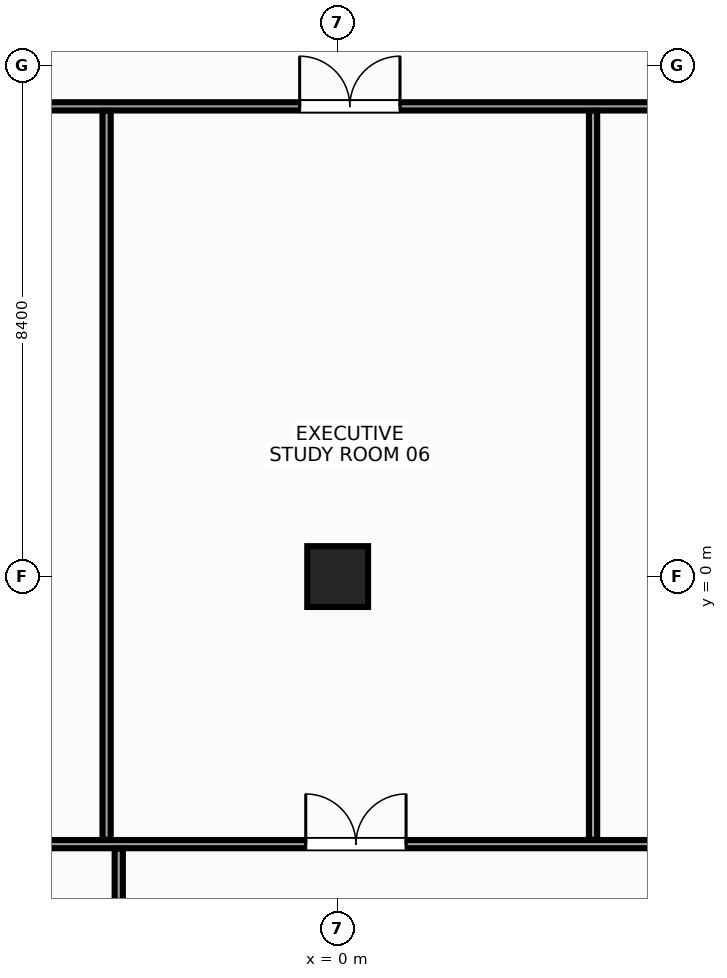
"""IFC4 building model, lengths in metres.
Left out: names, types, materials, properties, quantities, classifications, styles, units other than length and angle.
Written with IfcOpenShell. Run it as: python <this file> out.ifc"""

import sys

from ifc_helpers import new_model, si_unit, direction, frame, frame_2d, origin, origin_with_axes, origin_2d, place, context, subcontext, project, spatial, rectangle, extrude, source, transform, mapped, element, fill, save


model = new_model("IFC4")
c1 = context("Model", 3, precision=1e-05, world=origin(), true_north=direction((0.0, 1.0)))
c2 = subcontext(c1, "Body", "Model", "MODEL_VIEW")
j1 = project(units=[si_unit("LENGTHUNIT", "METRE"), si_unit("PLANEANGLEUNIT", "RADIAN")], contexts=[c1])
p1 = place(None, origin())
s1 = spatial("IfcSite", under=j1, at=p1, CompositionType="ELEMENT")
p2 = place(p1, origin())
s2 = spatial("IfcBuilding", under=s1, at=p2, CompositionType="ELEMENT")
p3 = place(p2, frame((0.0, 0.0, 131.6)))
s3 = spatial("IfcBuildingStorey", under=s2, at=p3, CompositionType="ELEMENT", Elevation=131.6)
m1 = source(origin(), c2, "Body", "SweptSolid", [
    extrude(rectangle(XDim=1.0, YDim=1.0, at=origin_2d()), origin(), (0.0, 0.0, 1.0), 3.6),
])
p4 = place(p3, origin_with_axes())
e1 = element("IfcColumn", 1, at=p4, inside=s3, PredefinedType="COLUMN", context=c2, shape_type="MappedRepresentation", body=[
    mapped(m1, transform((0.0, 0.0, 0.0), x_axis=(1.0, 0.0, 0.0), y_axis=(0.0, 1.0, 0.0), z_axis=(0.0, 0.0, 1.0), scale=1.0)),
])
m2 = source(origin(), c2, "Body", "SweptSolid", [
    extrude(rectangle(XDim=31.6, YDim=0.135, at=frame_2d((15.8, 0.0))), origin(), (0.0, 0.0, 1.0), 2.765),
])
p5 = place(p3, frame((-20.535, 7.732, 0.0), z_axis=(0.0, 0.0, 1.0), x_axis=(1.0, 0.0, 0.0)))
e2 = element("IfcWall", 2, at=p5, inside=s3, PredefinedType="PARTITIONING", context=c2, shape_type="MappedRepresentation", body=[
    mapped(m2, transform((0.0, 0.0, 0.0), x_axis=(1.0, 0.0, 0.0), y_axis=(0.0, 1.0, 0.0), z_axis=(0.0, 0.0, 1.0), scale=1.0)),
])
p6 = place(p5, frame((0.644, 0.0, 0.0)))
e3 = element("IfcOpeningElement", 3, at=p6, cuts=e2, PredefinedType="OPENING", context=c2, shape_type="SweptSolid", body=[
    extrude(rectangle(XDim=0.9, YDim=2.15, at=frame_2d((0.45, 1.075))), frame((0.0, 0.08, 0.0), z_axis=(0.0, -1.0, 0.0), x_axis=(1.0, 0.0, 0.0)), (0.0, 0.0, 1.0), 0.159),
])
p7 = place(p5, frame((5.21, 0.0, 0.0)))
e4 = element("IfcOpeningElement", 4, at=p7, cuts=e2, PredefinedType="OPENING", context=c2, shape_type="SweptSolid", body=[
    extrude(rectangle(XDim=1.65, YDim=2.35, at=frame_2d((0.825, 1.175))), frame((0.0, 0.08, 0.0), z_axis=(0.0, -1.0, 0.0), x_axis=(1.0, 0.0, 0.0)), (0.0, 0.0, 1.0), 0.159),
])
p8 = place(p5, frame((11.41, 0.0, 0.0)))
e5 = element("IfcOpeningElement", 5, at=p8, cuts=e2, PredefinedType="OPENING", context=c2, shape_type="SweptSolid", body=[
    extrude(rectangle(XDim=1.65, YDim=2.35, at=frame_2d((0.825, 1.175))), frame((0.0, 0.08, 0.0), z_axis=(0.0, -1.0, 0.0), x_axis=(1.0, 0.0, 0.0)), (0.0, 0.0, 1.0), 0.159),
])
p9 = place(p5, frame((19.91, 0.0, 0.0)))
e6 = element("IfcOpeningElement", 6, at=p9, cuts=e2, PredefinedType="OPENING", context=c2, shape_type="SweptSolid", body=[
    extrude(rectangle(XDim=1.65, YDim=2.35, at=frame_2d((0.825, 1.175))), frame((0.0, 0.08, 0.0), z_axis=(0.0, -1.0, 0.0), x_axis=(1.0, 0.0, 0.0)), (0.0, 0.0, 1.0), 0.159),
])
p10 = place(p5, frame((27.316, 0.0, 0.0)))
e7 = element("IfcOpeningElement", 7, at=p10, cuts=e2, PredefinedType="OPENING", context=c2, shape_type="SweptSolid", body=[
    extrude(rectangle(XDim=1.65, YDim=2.35, at=frame_2d((0.825, 1.175))), frame((0.0, 0.08, 0.0), z_axis=(0.0, -1.0, 0.0), x_axis=(1.0, 0.0, 0.0)), (0.0, 0.0, 1.0), 0.159),
])
m3 = source(origin(), c2, "Body", "SweptSolid", [
    extrude(rectangle(XDim=34.91, YDim=0.135, at=frame_2d((17.455, 0.0))), origin(), (0.0, 0.0, 1.0), 2.765),
])
p11 = place(p3, frame((-23.85, -4.4, 0.0), z_axis=(0.0, 0.0, 1.0), x_axis=(1.0, 0.0, 0.0)))
e8 = element("IfcWall", 8, at=p11, inside=s3, PredefinedType="PARTITIONING", context=c2, shape_type="MappedRepresentation", body=[
    mapped(m3, transform((0.0, 0.0, 0.0), x_axis=(1.0, 0.0, 0.0), y_axis=(0.0, 1.0, 0.0), z_axis=(0.0, 0.0, 1.0), scale=1.0)),
])
p12 = place(p11, frame((1.266, 0.0, 0.0)))
e9 = element("IfcOpeningElement", 9, at=p12, cuts=e8, PredefinedType="OPENING", context=c2, shape_type="SweptSolid", body=[
    extrude(rectangle(XDim=1.65, YDim=2.35, at=frame_2d((0.825, 1.175))), frame((0.0, 0.08, 0.0), z_axis=(0.0, -1.0, 0.0), x_axis=(1.0, 0.0, 0.0)), (0.0, 0.0, 1.0), 0.159),
])
p13 = place(p11, frame((8.725, 0.0, 0.0)))
e10 = element("IfcOpeningElement", 10, at=p13, cuts=e8, PredefinedType="OPENING", context=c2, shape_type="SweptSolid", body=[
    extrude(rectangle(XDim=1.65, YDim=2.35, at=frame_2d((0.825, 1.175))), frame((0.0, 0.08, 0.0), z_axis=(0.0, -1.0, 0.0), x_axis=(1.0, 0.0, 0.0)), (0.0, 0.0, 1.0), 0.159),
])
p14 = place(p11, frame((23.325, 0.0, 0.0)))
e11 = element("IfcOpeningElement", 11, at=p14, cuts=e8, PredefinedType="OPENING", context=c2, shape_type="SweptSolid", body=[
    extrude(rectangle(XDim=1.65, YDim=2.35, at=frame_2d((0.825, 1.175))), frame((0.0, 0.08, 0.0), z_axis=(0.0, -1.0, 0.0), x_axis=(1.0, 0.0, 0.0)), (0.0, 0.0, 1.0), 0.159),
])
m4 = source(origin(), c2, "Body", "SweptSolid", [
    extrude(rectangle(XDim=11.987, YDim=0.135, at=frame_2d((5.994, 0.0))), origin(), (0.0, 0.0, 1.0), 2.665),
])
for number, where, z_axis, x_axis in (
    (12, (-3.8, -4.327, 0.0), (0.0, 0.0, 1.0), (0.0, 1.0, 0.0)),
    (13, (4.2, -4.327, 0.0), (0.0, 0.0, 1.0), (0.0, 1.0, 0.0)),
):
    element("IfcWall", number, at=place(p3, frame(where, z_axis=z_axis, x_axis=x_axis)), inside=s3, PredefinedType="PARTITIONING", context=c2, shape_type="MappedRepresentation", body=[
        mapped(m4, transform((0.0, 0.0, 0.0), x_axis=(1.0, 0.0, 0.0), y_axis=(0.0, 1.0, 0.0), z_axis=(0.0, 0.0, 1.0), scale=1.0)),
    ])
m5 = source(origin(), c2, "Body", "SweptSolid", [
    extrude(rectangle(XDim=18.177, YDim=0.135, at=frame_2d((9.089, 0.0))), origin(), (0.0, 0.0, 1.0), 2.915),
])
p15 = place(p3, frame((-3.6, -22.65, 0.0), z_axis=(0.0, 0.0, 1.0), x_axis=(0.0, 1.0, 0.0)))
e14 = element("IfcWall", 14, at=p15, inside=s3, PredefinedType="PARTITIONING", context=c2, shape_type="MappedRepresentation", body=[
    mapped(m5, transform((0.0, 0.0, 0.0), x_axis=(1.0, 0.0, 0.0), y_axis=(0.0, 1.0, 0.0), z_axis=(0.0, 0.0, 1.0), scale=1.0)),
])
m6 = source(origin(), c2, "Body", "SweptSolid", [
    extrude(rectangle(XDim=1.65, YDim=2.35, at=frame_2d((0.825, 1.175))), frame((0.0, 0.025, 0.0), z_axis=(0.0, -1.0, 0.0), x_axis=(1.0, 0.0, 0.0)), (0.0, 0.0, 1.0), 0.05),
])
p16 = place(p9, origin())
e15 = element("IfcDoor", 15, at=p16, inside=s3, OperationType="DOUBLE_DOOR_SINGLE_SWING", PredefinedType="DOOR", context=c2, shape_type="MappedRepresentation", body=[
    mapped(m6, transform((0.0, 0.0, 0.0), x_axis=(1.0, 0.0, 0.0), y_axis=(0.0, 1.0, 0.0), z_axis=(0.0, 0.0, 1.0), scale=1.0)),
])
fill(e6, e15)
p17 = place(p14, origin())
e16 = element("IfcDoor", 16, at=p17, inside=s3, OperationType="DOUBLE_DOOR_SINGLE_SWING", PredefinedType="DOOR", context=c2, shape_type="MappedRepresentation", body=[
    mapped(m6, transform((0.0, 0.0, 0.0), x_axis=(1.0, 0.0, 0.0), y_axis=(0.0, 1.0, 0.0), z_axis=(0.0, 0.0, 1.0), scale=1.0)),
])
fill(e11, e16)
save(model, sys.argv[1])
